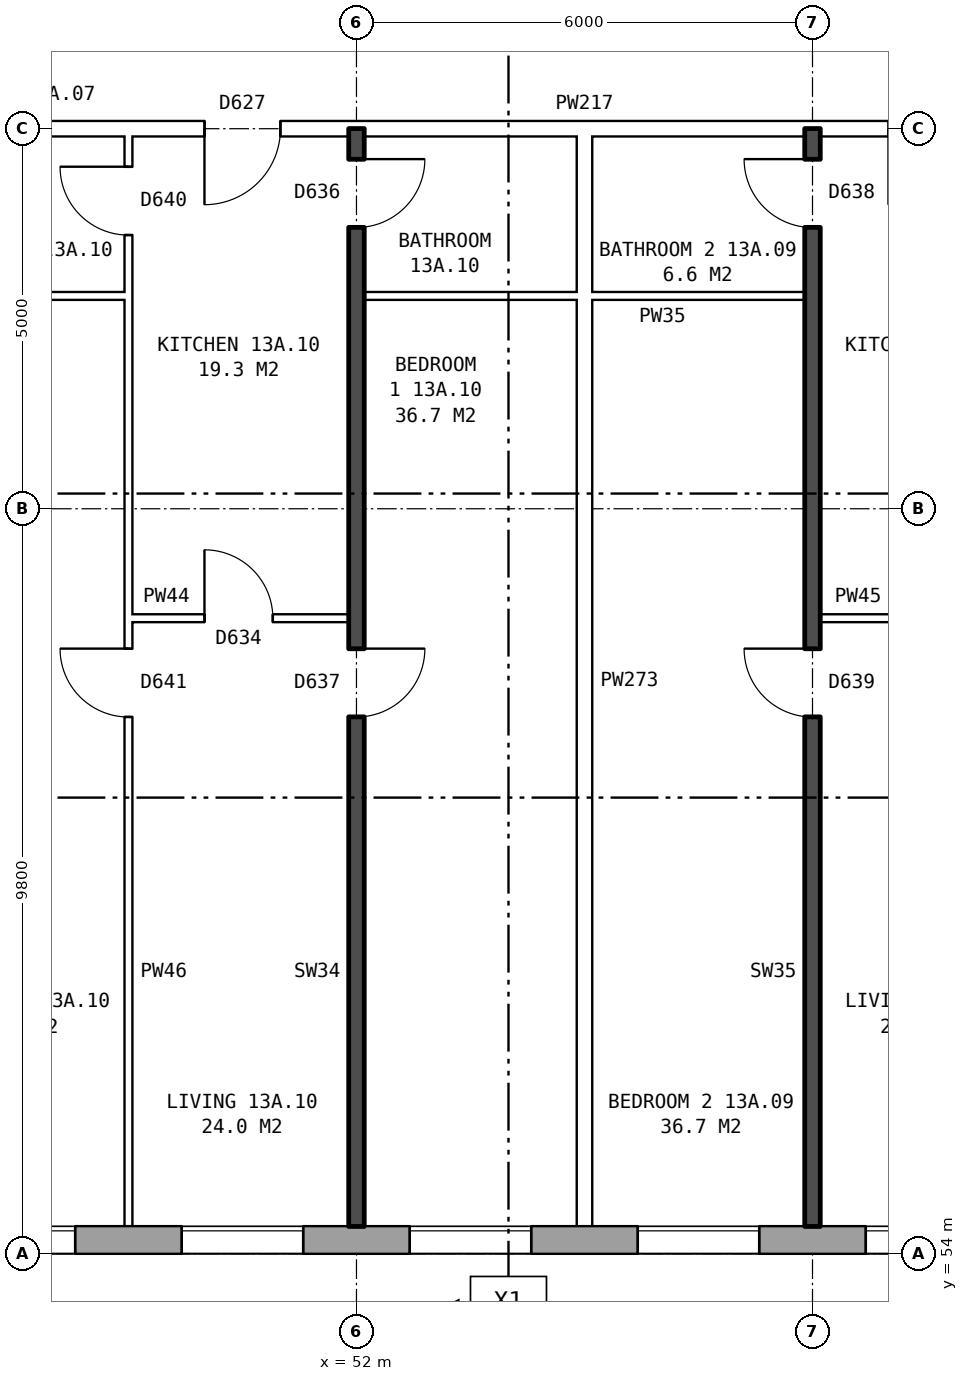
"""IFC4 building model, lengths in metres.
Left out: names, types, materials, properties, quantities, classifications, styles, units other than length and angle.
Written with IfcOpenShell. Run it as: python <this file> out.ifc"""

import sys

from ifc_helpers import new_model, si_unit, direction, frame, frame_2d, origin, place, context, subcontext, project, spatial, rectangle, extrude, element, fill, save


model = new_model("IFC4")
c1 = context("Model", 3, precision=1e-05, world=origin(), true_north=direction((0.0, 1.0)))
c2 = subcontext(c1, "Body", "Model", "MODEL_VIEW")
j1 = project(units=[si_unit("LENGTHUNIT", "METRE"), si_unit("PLANEANGLEUNIT", "RADIAN")], contexts=[c1])
p1 = place(None, origin())
s1 = spatial("IfcSite", under=j1, at=p1, CompositionType="ELEMENT")
p2 = place(p1, origin())
s2 = spatial("IfcBuilding", under=s1, at=p2, CompositionType="ELEMENT")
p3 = place(p2, frame((0.0, 0.0, 50.5)))
s3 = spatial("IfcBuildingStorey", under=s2, at=p3, CompositionType="ELEMENT", Elevation=50.5)
p4 = place(p3, frame((24.575, 54.18, 0.0), z_axis=(0.0, 0.0, 1.0), x_axis=(1.0, 0.0, 0.0)))
e1 = element("IfcWall", 1, at=p4, inside=s3, PredefinedType="STANDARD", context=c2, shape_type="SweptSolid", body=[
    extrude(rectangle(XDim=48.351, YDim=0.36, at=frame_2d((24.175, 0.0))), origin(), (0.0, 0.0, 1.0), 2.85),
])
p5 = place(p4, frame((1.125, 0.0, 0.8)))
e2 = element("IfcOpeningElement", 2, at=p5, cuts=e1, PredefinedType="OPENING", context=c2, shape_type="SweptSolid", body=[
    extrude(rectangle(XDim=1.6, YDim=1.8, at=frame_2d((0.8, 0.9))), frame((0.0, 0.19, 0.0), z_axis=(0.0, -1.0, 0.0), x_axis=(1.0, 0.0, 0.0)), (0.0, 0.0, 1.0), 0.38),
])
p6 = place(p4, frame((4.125, 0.0, 0.8)))
e3 = element("IfcOpeningElement", 3, at=p6, cuts=e1, PredefinedType="OPENING", context=c2, shape_type="SweptSolid", body=[
    extrude(rectangle(XDim=1.6, YDim=1.8, at=frame_2d((0.8, 0.9))), frame((0.0, 0.19, 0.0), z_axis=(0.0, -1.0, 0.0), x_axis=(1.0, 0.0, 0.0)), (0.0, 0.0, 1.0), 0.38),
])
p7 = place(p4, frame((6.025, 0.0, 0.8)))
e4 = element("IfcOpeningElement", 4, at=p7, cuts=e1, PredefinedType="OPENING", context=c2, shape_type="SweptSolid", body=[
    extrude(rectangle(XDim=1.0, YDim=1.8, at=frame_2d((0.5, 0.9))), frame((0.0, 0.19, 0.0), z_axis=(0.0, -1.0, 0.0), x_axis=(1.0, 0.0, 0.0)), (0.0, 0.0, 1.0), 0.38),
])
p8 = place(p4, frame((9.775, 0.0, 0.8)))
e5 = element("IfcOpeningElement", 5, at=p8, cuts=e1, PredefinedType="OPENING", context=c2, shape_type="SweptSolid", body=[
    extrude(rectangle(XDim=1.0, YDim=0.9, at=frame_2d((0.5, 0.45))), frame((0.0, 0.19, 0.0), z_axis=(0.0, -1.0, 0.0), x_axis=(1.0, 0.0, 0.0)), (0.0, 0.0, 1.0), 0.38),
])
p9 = place(p4, frame((13.125, 0.0, 0.8)))
e6 = element("IfcOpeningElement", 6, at=p9, cuts=e1, PredefinedType="OPENING", context=c2, shape_type="SweptSolid", body=[
    extrude(rectangle(XDim=1.6, YDim=1.8, at=frame_2d((0.8, 0.9))), frame((0.0, 0.19, 0.0), z_axis=(0.0, -1.0, 0.0), x_axis=(1.0, 0.0, 0.0)), (0.0, 0.0, 1.0), 0.38),
])
p10 = place(p4, frame((16.125, 0.0, 0.8)))
e7 = element("IfcOpeningElement", 7, at=p10, cuts=e1, PredefinedType="OPENING", context=c2, shape_type="SweptSolid", body=[
    extrude(rectangle(XDim=1.6, YDim=1.8, at=frame_2d((0.8, 0.9))), frame((0.0, 0.19, 0.0), z_axis=(0.0, -1.0, 0.0), x_axis=(1.0, 0.0, 0.0)), (0.0, 0.0, 1.0), 0.38),
])
p11 = place(p4, frame((19.125, 0.0, 0.8)))
e8 = element("IfcOpeningElement", 8, at=p11, cuts=e1, PredefinedType="OPENING", context=c2, shape_type="SweptSolid", body=[
    extrude(rectangle(XDim=1.6, YDim=1.8, at=frame_2d((0.8, 0.9))), frame((0.0, 0.19, 0.0), z_axis=(0.0, -1.0, 0.0), x_axis=(1.0, 0.0, 0.0)), (0.0, 0.0, 1.0), 0.38),
])
p12 = place(p4, frame((22.125, 0.0, 0.8)))
e9 = element("IfcOpeningElement", 9, at=p12, cuts=e1, PredefinedType="OPENING", context=c2, shape_type="SweptSolid", body=[
    extrude(rectangle(XDim=1.6, YDim=1.8, at=frame_2d((0.8, 0.9))), frame((0.0, 0.19, 0.0), z_axis=(0.0, -1.0, 0.0), x_axis=(1.0, 0.0, 0.0)), (0.0, 0.0, 1.0), 0.38),
])
p13 = place(p4, frame((25.125, 0.0, 0.8)))
e10 = element("IfcOpeningElement", 10, at=p13, cuts=e1, PredefinedType="OPENING", context=c2, shape_type="SweptSolid", body=[
    extrude(rectangle(XDim=1.6, YDim=1.8, at=frame_2d((0.8, 0.9))), frame((0.0, 0.19, 0.0), z_axis=(0.0, -1.0, 0.0), x_axis=(1.0, 0.0, 0.0)), (0.0, 0.0, 1.0), 0.38),
])
p14 = place(p4, frame((28.125, 0.0, 0.8)))
e11 = element("IfcOpeningElement", 11, at=p14, cuts=e1, PredefinedType="OPENING", context=c2, shape_type="SweptSolid", body=[
    extrude(rectangle(XDim=1.6, YDim=1.8, at=frame_2d((0.8, 0.9))), frame((0.0, 0.19, 0.0), z_axis=(0.0, -1.0, 0.0), x_axis=(1.0, 0.0, 0.0)), (0.0, 0.0, 1.0), 0.38),
])
p15 = place(p4, frame((31.125, 0.0, 0.8)))
e12 = element("IfcOpeningElement", 12, at=p15, cuts=e1, PredefinedType="OPENING", context=c2, shape_type="SweptSolid", body=[
    extrude(rectangle(XDim=1.6, YDim=1.8, at=frame_2d((0.8, 0.9))), frame((0.0, 0.19, 0.0), z_axis=(0.0, -1.0, 0.0), x_axis=(1.0, 0.0, 0.0)), (0.0, 0.0, 1.0), 0.38),
])
p16 = place(p4, frame((34.125, 0.0, 0.8)))
e13 = element("IfcOpeningElement", 13, at=p16, cuts=e1, PredefinedType="OPENING", context=c2, shape_type="SweptSolid", body=[
    extrude(rectangle(XDim=1.6, YDim=1.8, at=frame_2d((0.8, 0.9))), frame((0.0, 0.19, 0.0), z_axis=(0.0, -1.0, 0.0), x_axis=(1.0, 0.0, 0.0)), (0.0, 0.0, 1.0), 0.38),
])
p17 = place(p4, frame((36.575, 0.0, 0.45)))
e14 = element("IfcOpeningElement", 14, at=p17, cuts=e1, PredefinedType="OPENING", context=c2, shape_type="SweptSolid", body=[
    extrude(rectangle(XDim=1.2, YDim=1.8, at=frame_2d((0.6, 0.9))), frame((0.0, 0.19, 0.0), z_axis=(0.0, -1.0, 0.0), x_axis=(1.0, 0.0, 0.0)), (0.0, 0.0, 1.0), 0.38),
])
p18 = place(p4, frame((39.975, 0.0, 1.7)))
e15 = element("IfcOpeningElement", 15, at=p18, cuts=e1, PredefinedType="OPENING", context=c2, shape_type="SweptSolid", body=[
    extrude(rectangle(XDim=1.0, YDim=0.9, at=frame_2d((0.5, 0.45))), frame((0.0, 0.19, 0.0), z_axis=(0.0, -1.0, 0.0), x_axis=(1.0, 0.0, 0.0)), (0.0, 0.0, 1.0), 0.38),
])
p19 = place(p4, frame((43.125, 0.0, 0.8)))
e16 = element("IfcOpeningElement", 16, at=p19, cuts=e1, PredefinedType="OPENING", context=c2, shape_type="SweptSolid", body=[
    extrude(rectangle(XDim=1.6, YDim=1.8, at=frame_2d((0.8, 0.9))), frame((0.0, 0.19, 0.0), z_axis=(0.0, -1.0, 0.0), x_axis=(1.0, 0.0, 0.0)), (0.0, 0.0, 1.0), 0.38),
])
p20 = place(p4, frame((46.125, 0.0, 0.8)))
e17 = element("IfcOpeningElement", 17, at=p20, cuts=e1, PredefinedType="OPENING", context=c2, shape_type="SweptSolid", body=[
    extrude(rectangle(XDim=1.6, YDim=1.8, at=frame_2d((0.8, 0.9))), frame((0.0, 0.19, 0.0), z_axis=(0.0, -1.0, 0.0), x_axis=(1.0, 0.0, 0.0)), (0.0, 0.0, 1.0), 0.38),
])
p21 = place(p4, frame((7.325, 0.0, 1.7)))
e18 = element("IfcOpeningElement", 18, at=p21, cuts=e1, PredefinedType="OPENING", context=c2, shape_type="SweptSolid", body=[
    extrude(rectangle(XDim=1.0, YDim=0.9, at=frame_2d((0.5, 0.45))), frame((0.0, 0.19, 0.0), z_axis=(0.0, -1.0, 0.0), x_axis=(1.0, 0.0, 0.0)), (0.0, 0.0, 1.0), 0.38),
])
p22 = place(p4, frame((11.075, 0.0, 0.8)))
e19 = element("IfcOpeningElement", 19, at=p22, cuts=e1, PredefinedType="OPENING", context=c2, shape_type="SweptSolid", body=[
    extrude(rectangle(XDim=1.0, YDim=1.8, at=frame_2d((0.5, 0.9))), frame((0.0, 0.19, 0.0), z_axis=(0.0, -1.0, 0.0), x_axis=(1.0, 0.0, 0.0)), (0.0, 0.0, 1.0), 0.38),
])
p23 = place(p4, frame((38.075, 0.0, 0.45)))
e20 = element("IfcOpeningElement", 20, at=p23, cuts=e1, PredefinedType="OPENING", context=c2, shape_type="SweptSolid", body=[
    extrude(rectangle(XDim=1.0, YDim=0.9, at=frame_2d((0.5, 0.45))), frame((0.0, 0.19, 0.0), z_axis=(0.0, -1.0, 0.0), x_axis=(1.0, 0.0, 0.0)), (0.0, 0.0, 1.0), 0.38),
])
p24 = place(p4, frame((41.275, 0.0, 0.8)))
e21 = element("IfcOpeningElement", 21, at=p24, cuts=e1, PredefinedType="OPENING", context=c2, shape_type="SweptSolid", body=[
    extrude(rectangle(XDim=1.4, YDim=1.8, at=frame_2d((0.7, 0.9))), frame((0.0, 0.19, 0.0), z_axis=(0.0, -1.0, 0.0), x_axis=(1.0, 0.0, 0.0)), (0.0, 0.0, 1.0), 0.38),
])
p25 = place(p3, frame((49.0, 62.36, 0.0), z_axis=(0.0, 0.0, 1.0), x_axis=(1.0, 0.0, 0.0)))
e22 = element("IfcWall", 22, at=p25, inside=s3, PredefinedType="PARTITIONING", context=c2, shape_type="SweptSolid", body=[
    extrude(rectangle(XDim=2.9, YDim=0.1, at=frame_2d((1.45, 0.0))), origin(), (0.0, 0.0, 1.0), 2.85),
])
p26 = place(p25, frame((1.0, 0.0, 0.0)))
e23 = element("IfcOpeningElement", 23, at=p26, cuts=e22, PredefinedType="OPENING", context=c2, shape_type="SweptSolid", body=[
    extrude(rectangle(XDim=0.9, YDim=2.1, at=frame_2d((0.45, 1.05))), frame((0.0, 0.06, 0.0), z_axis=(0.0, -1.0, 0.0), x_axis=(1.0, 0.0, 0.0)), (0.0, 0.0, 1.0), 0.12),
])
p27 = place(p3, frame((58.1, 62.36, 0.0), z_axis=(0.0, 0.0, 1.0), x_axis=(1.0, 0.0, 0.0)))
e24 = element("IfcWall", 24, at=p27, inside=s3, PredefinedType="PARTITIONING", context=c2, shape_type="SweptSolid", body=[
    extrude(rectangle(XDim=2.9, YDim=0.1, at=frame_2d((1.45, 0.0))), origin(), (0.0, 0.0, 1.0), 2.85),
])
p28 = place(p27, frame((1.0, 0.0, 0.0)))
e25 = element("IfcOpeningElement", 25, at=p28, cuts=e24, PredefinedType="OPENING", context=c2, shape_type="SweptSolid", body=[
    extrude(rectangle(XDim=0.9, YDim=2.1, at=frame_2d((0.45, 1.05))), frame((0.0, 0.06, 0.0), z_axis=(0.0, -1.0, 0.0), x_axis=(1.0, 0.0, 0.0)), (0.0, 0.0, 1.0), 0.12),
])
p29 = place(p3, frame((46.1, 66.6, 0.0), z_axis=(0.0, 0.0, 1.0), x_axis=(1.0, 0.0, 0.0)))
e26 = element("IfcWall", 26, at=p29, inside=s3, PredefinedType="PARTITIONING", context=c2, shape_type="SweptSolid", body=[
    extrude(rectangle(XDim=2.9, YDim=0.1, at=frame_2d((1.45, 0.0))), origin(), (0.0, 0.0, 1.0), 2.85),
])
p30 = place(p3, frame((52.1, 66.6, 0.0), z_axis=(0.0, 0.0, 1.0), x_axis=(1.0, 0.0, 0.0)))
e27 = element("IfcWall", 27, at=p30, inside=s3, PredefinedType="PARTITIONING", context=c2, shape_type="SweptSolid", body=[
    extrude(rectangle(XDim=5.8, YDim=0.1, at=frame_2d((2.9, 0.0))), origin(), (0.0, 0.0, 1.0), 2.85),
])
p31 = place(p3, frame((44.36, 68.8, 0.0), z_axis=(0.0, 0.0, 1.0), x_axis=(1.0, 0.0, 0.0)))
e28 = element("IfcWall", 28, at=p31, inside=s3, PredefinedType="PARTITIONING", context=c2, shape_type="SweptSolid", body=[
    extrude(rectangle(XDim=19.28, YDim=0.2, at=frame_2d((9.64, 0.0))), origin(), (0.0, 0.0, 1.0), 2.85),
])
p32 = place(p31, frame((14.64, 0.0, 0.0)))
e29 = element("IfcOpeningElement", 29, at=p32, cuts=e28, PredefinedType="OPENING", context=c2, shape_type="SweptSolid", body=[
    extrude(rectangle(XDim=1.0, YDim=2.1, at=frame_2d((0.5, 1.05))), frame((0.0, 0.11, 0.0), z_axis=(0.0, -1.0, 0.0), x_axis=(1.0, 0.0, 0.0)), (0.0, 0.0, 1.0), 0.22),
])
p33 = place(p31, frame((5.64, 0.0, 0.0)))
e30 = element("IfcOpeningElement", 30, at=p33, cuts=e28, PredefinedType="OPENING", context=c2, shape_type="SweptSolid", body=[
    extrude(rectangle(XDim=1.0, YDim=2.1, at=frame_2d((0.5, 1.05))), frame((0.0, 0.11, 0.0), z_axis=(0.0, -1.0, 0.0), x_axis=(1.0, 0.0, 0.0)), (0.0, 0.0, 1.0), 0.22),
])
p34 = place(p3, frame((49.0, 54.36, 0.0), z_axis=(0.0, 0.0, 1.0), x_axis=(0.0, 1.0, 0.0)))
e31 = element("IfcWall", 31, at=p34, inside=s3, PredefinedType="PARTITIONING", context=c2, shape_type="SweptSolid", body=[
    extrude(rectangle(XDim=14.34, YDim=0.1, at=frame_2d((7.17, 0.0))), origin(), (0.0, 0.0, 1.0), 2.85),
])
p35 = place(p34, frame((6.7, 0.0, 0.0)))
e32 = element("IfcOpeningElement", 32, at=p35, cuts=e31, PredefinedType="OPENING", context=c2, shape_type="SweptSolid", body=[
    extrude(rectangle(XDim=0.9, YDim=2.1, at=frame_2d((0.45, 1.05))), frame((0.0, 0.06, 0.0), z_axis=(0.0, -1.0, 0.0), x_axis=(1.0, 0.0, 0.0)), (0.0, 0.0, 1.0), 0.12),
])
p36 = place(p34, frame((13.04, 0.0, 0.0)))
e33 = element("IfcOpeningElement", 33, at=p36, cuts=e31, PredefinedType="OPENING", context=c2, shape_type="SweptSolid", body=[
    extrude(rectangle(XDim=0.9, YDim=2.1, at=frame_2d((0.45, 1.05))), frame((0.0, 0.06, 0.0), z_axis=(0.0, -1.0, 0.0), x_axis=(1.0, 0.0, 0.0)), (0.0, 0.0, 1.0), 0.12),
])
p37 = place(p3, frame((52.0, 54.36, 0.0), z_axis=(0.0, 0.0, 1.0), x_axis=(0.0, 1.0, 0.0)))
e34 = element("IfcWall", 34, at=p37, inside=s3, PredefinedType="SOLIDWALL", context=c2, shape_type="SweptSolid", body=[
    extrude(rectangle(XDim=14.44, YDim=0.2, at=frame_2d((7.22, 0.0))), origin(), (0.0, 0.0, 1.0), 2.85),
])
p38 = place(p37, frame((6.7, 0.0, 0.0)))
e35 = element("IfcOpeningElement", 35, at=p38, cuts=e34, PredefinedType="OPENING", context=c2, shape_type="SweptSolid", body=[
    extrude(rectangle(XDim=0.9, YDim=2.1, at=frame_2d((0.45, 1.05))), frame((0.0, 0.11, 0.0), z_axis=(0.0, -1.0, 0.0), x_axis=(1.0, 0.0, 0.0)), (0.0, 0.0, 1.0), 0.22),
])
p39 = place(p37, frame((13.14, 0.0, 0.0)))
e36 = element("IfcOpeningElement", 36, at=p39, cuts=e34, PredefinedType="OPENING", context=c2, shape_type="SweptSolid", body=[
    extrude(rectangle(XDim=0.9, YDim=2.1, at=frame_2d((0.45, 1.05))), frame((0.0, 0.11, 0.0), z_axis=(0.0, -1.0, 0.0), x_axis=(1.0, 0.0, 0.0)), (0.0, 0.0, 1.0), 0.22),
])
p40 = place(p3, frame((55.0, 54.36, 0.0), z_axis=(0.0, 0.0, 1.0), x_axis=(0.0, 1.0, 0.0)))
e37 = element("IfcWall", 37, at=p40, inside=s3, PredefinedType="PARTITIONING", context=c2, shape_type="SweptSolid", body=[
    extrude(rectangle(XDim=14.34, YDim=0.2, at=frame_2d((7.17, 0.0))), origin(), (0.0, 0.0, 1.0), 2.85),
])
p41 = place(p3, frame((58.0, 54.36, 0.0), z_axis=(0.0, 0.0, 1.0), x_axis=(0.0, 1.0, 0.0)))
e38 = element("IfcWall", 38, at=p41, inside=s3, PredefinedType="SOLIDWALL", context=c2, shape_type="SweptSolid", body=[
    extrude(rectangle(XDim=14.44, YDim=0.2, at=frame_2d((7.22, 0.0))), origin(), (0.0, 0.0, 1.0), 2.85),
])
p42 = place(p41, frame((6.7, 0.0, 0.0)))
e39 = element("IfcOpeningElement", 39, at=p42, cuts=e38, PredefinedType="OPENING", context=c2, shape_type="SweptSolid", body=[
    extrude(rectangle(XDim=0.9, YDim=2.1, at=frame_2d((0.45, 1.05))), frame((0.0, 0.11, 0.0), z_axis=(0.0, -1.0, 0.0), x_axis=(1.0, 0.0, 0.0)), (0.0, 0.0, 1.0), 0.22),
])
p43 = place(p41, frame((13.14, 0.0, 0.0)))
e40 = element("IfcOpeningElement", 40, at=p43, cuts=e38, PredefinedType="OPENING", context=c2, shape_type="SweptSolid", body=[
    extrude(rectangle(XDim=0.9, YDim=2.1, at=frame_2d((0.45, 1.05))), frame((0.0, 0.11, 0.0), z_axis=(0.0, -1.0, 0.0), x_axis=(1.0, 0.0, 0.0)), (0.0, 0.0, 1.0), 0.22),
])
p44 = place(p12, origin())
e41 = element("IfcWindow", 41, at=p44, inside=s3, PartitioningType="SINGLE_PANEL", PredefinedType="WINDOW", context=c2, shape_type="SweptSolid", body=[
    extrude(rectangle(XDim=1.6, YDim=1.8, at=frame_2d((0.8, 0.9))), frame((0.0, 0.15, 0.0), z_axis=(0.0, -1.0, 0.0), x_axis=(1.0, 0.0, 0.0)), (0.0, 0.0, 1.0), 0.06),
])
fill(e9, e41)
p45 = place(p13, origin())
e42 = element("IfcWindow", 42, at=p45, inside=s3, PartitioningType="SINGLE_PANEL", PredefinedType="WINDOW", context=c2, shape_type="SweptSolid", body=[
    extrude(rectangle(XDim=1.6, YDim=1.8, at=frame_2d((0.8, 0.9))), frame((0.0, 0.15, 0.0), z_axis=(0.0, -1.0, 0.0), x_axis=(1.0, 0.0, 0.0)), (0.0, 0.0, 1.0), 0.06),
])
fill(e10, e42)
p46 = place(p14, origin())
e43 = element("IfcWindow", 43, at=p46, inside=s3, PartitioningType="SINGLE_PANEL", PredefinedType="WINDOW", context=c2, shape_type="SweptSolid", body=[
    extrude(rectangle(XDim=1.6, YDim=1.8, at=frame_2d((0.8, 0.9))), frame((0.0, 0.15, 0.0), z_axis=(0.0, -1.0, 0.0), x_axis=(1.0, 0.0, 0.0)), (0.0, 0.0, 1.0), 0.06),
])
fill(e11, e43)
p47 = place(p15, origin())
e44 = element("IfcWindow", 44, at=p47, inside=s3, PartitioningType="SINGLE_PANEL", PredefinedType="WINDOW", context=c2, shape_type="SweptSolid", body=[
    extrude(rectangle(XDim=1.6, YDim=1.8, at=frame_2d((0.8, 0.9))), frame((0.0, 0.15, 0.0), z_axis=(0.0, -1.0, 0.0), x_axis=(1.0, 0.0, 0.0)), (0.0, 0.0, 1.0), 0.06),
])
fill(e12, e44)
p48 = place(p16, origin())
e45 = element("IfcWindow", 45, at=p48, inside=s3, PartitioningType="SINGLE_PANEL", PredefinedType="WINDOW", context=c2, shape_type="SweptSolid", body=[
    extrude(rectangle(XDim=1.6, YDim=1.8, at=frame_2d((0.8, 0.9))), frame((0.0, 0.15, 0.0), z_axis=(0.0, -1.0, 0.0), x_axis=(1.0, 0.0, 0.0)), (0.0, 0.0, 1.0), 0.06),
])
fill(e13, e45)
p49 = place(p42, origin())
e46 = element("IfcDoor", 46, at=p49, inside=s3, OperationType="SINGLE_SWING_RIGHT", PredefinedType="DOOR", context=c2, shape_type="SweptSolid", body=[
    extrude(rectangle(XDim=0.9, YDim=2.1, at=frame_2d((0.45, 1.05))), frame((0.0, 0.025, 0.0), z_axis=(0.0, -1.0, 0.0), x_axis=(1.0, 0.0, 0.0)), (0.0, 0.0, 1.0), 0.05),
])
fill(e39, e46)
p50 = place(p43, origin())
e47 = element("IfcDoor", 47, at=p50, inside=s3, OperationType="SINGLE_SWING_RIGHT", PredefinedType="DOOR", context=c2, shape_type="SweptSolid", body=[
    extrude(rectangle(XDim=0.9, YDim=2.1, at=frame_2d((0.45, 1.05))), frame((0.0, 0.025, 0.0), z_axis=(0.0, -1.0, 0.0), x_axis=(1.0, 0.0, 0.0)), (0.0, 0.0, 1.0), 0.05),
])
fill(e40, e47)
p51 = place(p38, frame((0.9, 0.0, 0.0), z_axis=(0.0, 0.0, 1.0), x_axis=(-1.0, 0.0, 0.0)))
e48 = element("IfcDoor", 48, at=p51, inside=s3, OperationType="SINGLE_SWING_LEFT", PredefinedType="DOOR", context=c2, shape_type="SweptSolid", body=[
    extrude(rectangle(XDim=0.9, YDim=2.1, at=frame_2d((0.45, 1.05))), frame((0.0, 0.025, 0.0), z_axis=(0.0, -1.0, 0.0), x_axis=(1.0, 0.0, 0.0)), (0.0, 0.0, 1.0), 0.05),
])
fill(e35, e48)
p52 = place(p35, origin())
e49 = element("IfcDoor", 49, at=p52, inside=s3, OperationType="SINGLE_SWING_RIGHT", PredefinedType="DOOR", context=c2, shape_type="SweptSolid", body=[
    extrude(rectangle(XDim=0.9, YDim=2.1, at=frame_2d((0.45, 1.05))), frame((0.0, 0.025, 0.0), z_axis=(0.0, -1.0, 0.0), x_axis=(1.0, 0.0, 0.0)), (0.0, 0.0, 1.0), 0.05),
])
fill(e32, e49)
p53 = place(p33, frame((1.0, 0.0, 0.0), z_axis=(0.0, 0.0, 1.0), x_axis=(-1.0, 0.0, 0.0)))
e50 = element("IfcDoor", 50, at=p53, inside=s3, OperationType="SINGLE_SWING_RIGHT", PredefinedType="DOOR", context=c2, shape_type="SweptSolid", body=[
    extrude(rectangle(XDim=1.0, YDim=2.1, at=frame_2d((0.5, 1.05))), frame((0.0, 0.025, 0.0), z_axis=(0.0, -1.0, 0.0), x_axis=(1.0, 0.0, 0.0)), (0.0, 0.0, 1.0), 0.05),
])
fill(e30, e50)
p54 = place(p26, origin())
e51 = element("IfcDoor", 51, at=p54, inside=s3, OperationType="SINGLE_SWING_LEFT", PredefinedType="DOOR", context=c2, shape_type="SweptSolid", body=[
    extrude(rectangle(XDim=0.9, YDim=2.1, at=frame_2d((0.45, 1.05))), frame((0.0, 0.025, 0.0), z_axis=(0.0, -1.0, 0.0), x_axis=(1.0, 0.0, 0.0)), (0.0, 0.0, 1.0), 0.05),
])
fill(e23, e51)
p55 = place(p39, frame((0.9, 0.0, 0.0), z_axis=(0.0, 0.0, 1.0), x_axis=(-1.0, 0.0, 0.0)))
e52 = element("IfcDoor", 52, at=p55, inside=s3, OperationType="SINGLE_SWING_LEFT", PredefinedType="DOOR", context=c2, shape_type="SweptSolid", body=[
    extrude(rectangle(XDim=0.9, YDim=2.1, at=frame_2d((0.45, 1.05))), frame((0.0, 0.025, 0.0), z_axis=(0.0, -1.0, 0.0), x_axis=(1.0, 0.0, 0.0)), (0.0, 0.0, 1.0), 0.05),
])
fill(e36, e52)
p56 = place(p36, origin())
e53 = element("IfcDoor", 53, at=p56, inside=s3, OperationType="SINGLE_SWING_RIGHT", PredefinedType="DOOR", context=c2, shape_type="SweptSolid", body=[
    extrude(rectangle(XDim=0.9, YDim=2.1, at=frame_2d((0.45, 1.05))), frame((0.0, 0.025, 0.0), z_axis=(0.0, -1.0, 0.0), x_axis=(1.0, 0.0, 0.0)), (0.0, 0.0, 1.0), 0.05),
])
fill(e33, e53)
save(model, sys.argv[1])
